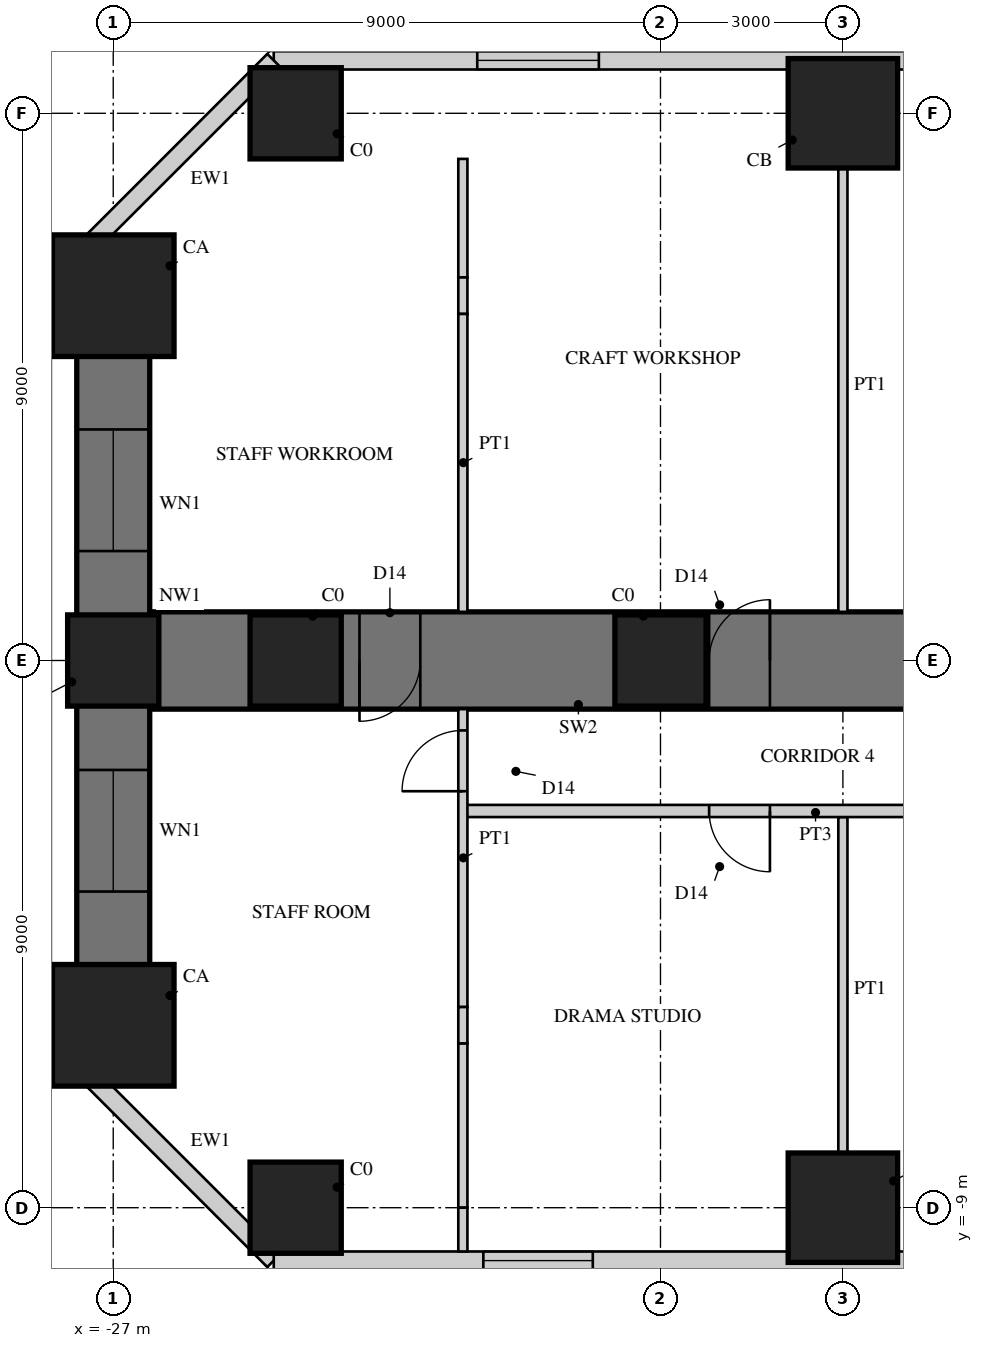
"""IFC4 building model, lengths in metres.
Left out: names, types, materials, properties, quantities, classifications, styles, units other than length and angle.
Written with IfcOpenShell. Run it as: python <this file> out.ifc"""

import sys

from ifc_helpers import new_model, si_unit, direction, frame, frame_2d, origin, origin_2d, place, context, subcontext, project, spatial, rectangle, hollow_rectangle, extrude, element, fill, save


model = new_model("IFC4")
c1 = context("Model", 3, precision=1e-05, world=origin(), true_north=direction((0.0, 1.0)))
c2 = subcontext(c1, "Body", "Model", "MODEL_VIEW")
j1 = project(units=[si_unit("LENGTHUNIT", "METRE"), si_unit("PLANEANGLEUNIT", "RADIAN")], contexts=[c1])
p1 = place(None, origin())
s1 = spatial("IfcSite", under=j1, at=p1, CompositionType="ELEMENT")
p2 = place(p1, origin())
s2 = spatial("IfcBuilding", under=s1, at=p2, CompositionType="ELEMENT")
p3 = place(p2, frame((0.0, 0.0, 14.0)))
s3 = spatial("IfcBuildingStorey", under=s2, at=p3, CompositionType="ELEMENT", Elevation=14.0)
p4 = place(p3, frame((-9.0, 0.0, 0.0), z_axis=(0.0, 0.0, 1.0), x_axis=(-1.0, 0.0, 0.0)))
e1 = element("IfcWall", 1, at=p4, inside=s3, PredefinedType="SHEAR", context=c2, shape_type="SweptSolid", body=[
    extrude(rectangle(XDim=18.0, YDim=1.6, at=frame_2d((9.0, 0.0))), origin(), (0.0, 0.0, 1.0), 4.5),
])
p5 = place(p4, frame((1.85, 0.0, 0.0)))
e2 = element("IfcOpeningElement", 2, at=p5, cuts=e1, PredefinedType="OPENING", context=c2, shape_type="SweptSolid", body=[
    extrude(rectangle(XDim=1.0, YDim=2.2, at=frame_2d((0.5, 1.1))), frame((0.0, 0.81, 0.0), z_axis=(0.0, -1.0, 0.0), x_axis=(1.0, 0.0, 0.0)), (0.0, 0.0, 1.0), 1.62),
])
p6 = place(p4, frame((7.2, 0.0, 0.0)))
e3 = element("IfcOpeningElement", 3, at=p6, cuts=e1, PredefinedType="OPENING", context=c2, shape_type="SweptSolid", body=[
    extrude(rectangle(XDim=1.0, YDim=2.2, at=frame_2d((0.5, 1.1))), frame((0.0, 0.81, 0.0), z_axis=(0.0, -1.0, 0.0), x_axis=(1.0, 0.0, 0.0)), (0.0, 0.0, 1.0), 1.62),
])
p7 = place(p4, frame((12.95, 0.0, 0.0)))
e4 = element("IfcOpeningElement", 4, at=p7, cuts=e1, PredefinedType="OPENING", context=c2, shape_type="SweptSolid", body=[
    extrude(rectangle(XDim=1.0, YDim=2.2, at=frame_2d((0.5, 1.1))), frame((0.0, 0.81, 0.0), z_axis=(0.0, -1.0, 0.0), x_axis=(1.0, 0.0, 0.0)), (0.0, 0.0, 1.0), 1.62),
])
p8 = place(p3, frame((-27.0, 6.0, 0.0), z_axis=(0.0, 0.0, 1.0), x_axis=(0.0, -1.0, 0.0)))
e5 = element("IfcWall", 5, at=p8, inside=s3, PredefinedType="SHEAR", context=c2, shape_type="SweptSolid", body=[
    extrude(rectangle(XDim=12.0, YDim=1.2, at=frame_2d((6.0, 0.0))), origin(), (0.0, 0.0, 1.0), 4.5),
])
p9 = place(p8, frame((2.2, 0.0, 0.9)))
e6 = element("IfcOpeningElement", 6, at=p9, cuts=e5, PredefinedType="OPENING", context=c2, shape_type="SweptSolid", body=[
    extrude(rectangle(XDim=2.0, YDim=1.8, at=frame_2d((1.0, 0.9))), frame((0.0, 0.61, 0.0), z_axis=(0.0, -1.0, 0.0), x_axis=(1.0, 0.0, 0.0)), (0.0, 0.0, 1.0), 1.22),
])
p10 = place(p8, frame((7.8, 0.0, 0.9)))
e7 = element("IfcOpeningElement", 7, at=p10, cuts=e5, PredefinedType="OPENING", context=c2, shape_type="SweptSolid", body=[
    extrude(rectangle(XDim=2.0, YDim=1.8, at=frame_2d((1.0, 0.9))), frame((0.0, 0.61, 0.0), z_axis=(0.0, -1.0, 0.0), x_axis=(1.0, 0.0, 0.0)), (0.0, 0.0, 1.0), 1.22),
])
p11 = place(p3, frame((-15.0, 9.0, 0.0), z_axis=(0.0, 0.0, 1.0), x_axis=(1.0, 0.0, 0.0)))
e8 = element("IfcColumn", 8, at=p11, inside=s3, PredefinedType="COLUMN", context=c2, shape_type="SweptSolid", body=[
    extrude(rectangle(XDim=1.8, YDim=1.8, at=origin_2d()), origin(), (0.0, 0.0, 1.0), 4.5),
])
p12 = place(p3, frame((-24.0, 9.0, 0.0), z_axis=(0.0, 0.0, 1.0), x_axis=(1.0, 0.0, 0.0)))
e9 = element("IfcColumn", 9, at=p12, inside=s3, PredefinedType="COLUMN", context=c2, shape_type="SweptSolid", body=[
    extrude(rectangle(XDim=1.5, YDim=1.5, at=origin_2d()), origin(), (0.0, 0.0, 1.0), 4.5),
])
p13 = place(p3, frame((-15.0, -9.0, 0.0), z_axis=(0.0, 0.0, 1.0), x_axis=(1.0, 0.0, 0.0)))
e10 = element("IfcColumn", 10, at=p13, inside=s3, PredefinedType="COLUMN", context=c2, shape_type="SweptSolid", body=[
    extrude(rectangle(XDim=1.8, YDim=1.8, at=origin_2d()), origin(), (0.0, 0.0, 1.0), 4.5),
])
p14 = place(p3, frame((-24.0, -9.0, 0.0), z_axis=(0.0, 0.0, 1.0), x_axis=(1.0, 0.0, 0.0)))
e11 = element("IfcColumn", 11, at=p14, inside=s3, PredefinedType="COLUMN", context=c2, shape_type="SweptSolid", body=[
    extrude(rectangle(XDim=1.5, YDim=1.5, at=origin_2d()), origin(), (0.0, 0.0, 1.0), 4.5),
])
p15 = place(p3, frame((-27.0, 6.0, 0.0), z_axis=(0.0, 0.0, 1.0), x_axis=(1.0, 0.0, 0.0)))
e12 = element("IfcColumn", 12, at=p15, inside=s3, PredefinedType="COLUMN", context=c2, shape_type="SweptSolid", body=[
    extrude(rectangle(XDim=2.0, YDim=2.0, at=origin_2d()), origin(), (0.0, 0.0, 1.0), 4.5),
])
p16 = place(p3, frame((-27.0, 0.0, 0.0), z_axis=(0.0, 0.0, 1.0), x_axis=(1.0, 0.0, 0.0)))
e13 = element("IfcColumn", 13, at=p16, inside=s3, PredefinedType="COLUMN", context=c2, shape_type="SweptSolid", body=[
    extrude(rectangle(XDim=1.5, YDim=1.5, at=origin_2d()), origin(), (0.0, 0.0, 1.0), 4.5),
])
p17 = place(p3, frame((-27.0, -6.0, 0.0), z_axis=(0.0, 0.0, 1.0), x_axis=(1.0, 0.0, 0.0)))
e14 = element("IfcColumn", 14, at=p17, inside=s3, PredefinedType="COLUMN", context=c2, shape_type="SweptSolid", body=[
    extrude(rectangle(XDim=2.0, YDim=2.0, at=origin_2d()), origin(), (0.0, 0.0, 1.0), 4.5),
])
for number, where, z_axis, x_axis in (
    (15, (-18.0, 0.0, 0.0), (0.0, 0.0, 1.0), (1.0, 0.0, 0.0)),
    (16, (-24.0, 0.0, 0.0), (0.0, 0.0, 1.0), (1.0, 0.0, 0.0)),
):
    element("IfcColumn", number, at=place(p3, frame(where, z_axis=z_axis, x_axis=x_axis)), inside=s3, PredefinedType="COLUMN", context=c2, shape_type="SweptSolid", body=[
        extrude(rectangle(XDim=1.5, YDim=1.5, at=origin_2d()), origin(), (0.0, 0.0, 1.0), 4.5),
    ])
p18 = place(p3, frame((-9.87, 9.87, 0.0), z_axis=(0.0, 0.0, 1.0), x_axis=(-1.0, 0.0, 0.0)))
e17 = element("IfcWall", 17, at=p18, inside=s3, PredefinedType="SOLIDWALL", context=c2, shape_type="SweptSolid", body=[
    extrude(rectangle(XDim=14.49, YDim=0.3, at=frame_2d((7.245, 0.0))), origin(), (0.0, 0.0, 1.0), 4.25),
])
p19 = place(p18, frame((9.143, 0.0, 0.9)))
e18 = element("IfcOpeningElement", 18, at=p19, cuts=e17, PredefinedType="OPENING", context=c2, shape_type="SweptSolid", body=[
    extrude(rectangle(XDim=2.0, YDim=1.8, at=frame_2d((1.0, 0.9))), frame((0.0, 0.16, 0.0), z_axis=(0.0, -1.0, 0.0), x_axis=(1.0, 0.0, 0.0)), (0.0, 0.0, 1.0), 0.32),
])
for number, where, z_axis, x_axis in (
    (19, (-24.36, 9.87, 0.0), (0.0, 0.0, 1.0), (-0.707, -0.707, 0.0)),
    (20, (-27.6, -6.63, 0.0), (0.0, 0.0, 1.0), (0.707, -0.707, 0.0)),
):
    element("IfcWall", number, at=place(p3, frame(where, z_axis=z_axis, x_axis=x_axis)), inside=s3, PredefinedType="SOLIDWALL", context=c2, shape_type="SweptSolid", body=[
        extrude(rectangle(XDim=4.582, YDim=0.3, at=frame_2d((2.291, 0.0))), origin(), (0.0, 0.0, 1.0), 4.25),
    ])
p20 = place(p3, frame((-24.36, -9.87, 0.0), z_axis=(0.0, 0.0, 1.0), x_axis=(1.0, 0.0, 0.0)))
e21 = element("IfcWall", 21, at=p20, inside=s3, PredefinedType="SOLIDWALL", context=c2, shape_type="SweptSolid", body=[
    extrude(rectangle(XDim=14.49, YDim=0.3, at=frame_2d((7.245, 0.0))), origin(), (0.0, 0.0, 1.0), 4.25),
])
p21 = place(p20, frame((10.9, 0.0, 0.0)))
e22 = element("IfcOpeningElement", 22, at=p21, cuts=e21, PredefinedType="OPENING", context=c2, shape_type="SweptSolid", body=[
    extrude(rectangle(XDim=1.0, YDim=2.4, at=frame_2d((0.5, 1.2))), frame((0.0, 0.16, 0.0), z_axis=(0.0, -1.0, 0.0), x_axis=(1.0, 0.0, 0.0)), (0.0, 0.0, 1.0), 0.32),
])
p22 = place(p20, frame((3.447, 0.0, 0.6)))
e23 = element("IfcOpeningElement", 23, at=p22, cuts=e21, PredefinedType="OPENING", context=c2, shape_type="SweptSolid", body=[
    extrude(rectangle(XDim=1.8, YDim=2.1, at=frame_2d((0.9, 1.05))), frame((0.0, 0.16, 0.0), z_axis=(0.0, -1.0, 0.0), x_axis=(1.0, 0.0, 0.0)), (0.0, 0.0, 1.0), 0.32),
])
p23 = place(p20, frame((12.141, 0.0, 0.6)))
e24 = element("IfcOpeningElement", 24, at=p23, cuts=e21, PredefinedType="OPENING", context=c2, shape_type="SweptSolid", body=[
    extrude(rectangle(XDim=1.8, YDim=2.1, at=frame_2d((0.9, 1.05))), frame((0.0, 0.16, 0.0), z_axis=(0.0, -1.0, 0.0), x_axis=(1.0, 0.0, 0.0)), (0.0, 0.0, 1.0), 0.32),
])
p24 = place(p3, frame((-15.0, -2.575, 0.0), z_axis=(0.0, 0.0, 1.0), x_axis=(0.0, -1.0, 0.0)))
e25 = element("IfcWall", 25, at=p24, inside=s3, PredefinedType="PARTITIONING", context=c2, shape_type="SweptSolid", body=[
    extrude(rectangle(XDim=5.675, YDim=0.15, at=frame_2d((2.837, 0.0))), origin(), (0.0, 0.0, 1.0), 3.2),
])
p25 = place(p3, frame((-15.0, 8.25, 0.0), z_axis=(0.0, 0.0, 1.0), x_axis=(0.0, -1.0, 0.0)))
e26 = element("IfcWall", 26, at=p25, inside=s3, PredefinedType="PARTITIONING", context=c2, shape_type="SweptSolid", body=[
    extrude(rectangle(XDim=7.45, YDim=0.15, at=frame_2d((3.725, 0.0))), origin(), (0.0, 0.0, 1.0), 3.2),
])
p26 = place(p3, frame((-9.65, -2.475, 0.0), z_axis=(0.0, 0.0, 1.0), x_axis=(-1.0, 0.0, 0.0)))
e27 = element("IfcWall", 27, at=p26, inside=s3, PredefinedType="SOLIDWALL", context=c2, shape_type="SweptSolid", body=[
    extrude(rectangle(XDim=11.6, YDim=0.2, at=frame_2d((5.8, 0.0))), origin(), (0.0, 0.0, 1.0), 4.25),
])
p27 = place(p26, frame((1.2, 0.0, 0.0)))
e28 = element("IfcOpeningElement", 28, at=p27, cuts=e27, PredefinedType="OPENING", context=c2, shape_type="SweptSolid", body=[
    extrude(rectangle(XDim=1.0, YDim=2.2, at=frame_2d((0.5, 1.1))), frame((0.0, 0.11, 0.0), z_axis=(0.0, -1.0, 0.0), x_axis=(1.0, 0.0, 0.0)), (0.0, 0.0, 1.0), 0.22),
])
p28 = place(p26, frame((6.55, 0.0, 0.0)))
e29 = element("IfcOpeningElement", 29, at=p28, cuts=e27, PredefinedType="OPENING", context=c2, shape_type="SweptSolid", body=[
    extrude(rectangle(XDim=1.0, YDim=2.2, at=frame_2d((0.5, 1.1))), frame((0.0, 0.11, 0.0), z_axis=(0.0, -1.0, 0.0), x_axis=(1.0, 0.0, 0.0)), (0.0, 0.0, 1.0), 0.22),
])
p29 = place(p3, frame((-21.25, 8.25, 0.0), z_axis=(0.0, 0.0, 1.0), x_axis=(0.0, -1.0, 0.0)))
e30 = element("IfcWall", 30, at=p29, inside=s3, PredefinedType="PARTITIONING", context=c2, shape_type="SweptSolid", body=[
    extrude(rectangle(XDim=1.95, YDim=0.15, at=frame_2d((0.975, 0.0))), origin(), (0.0, 0.0, 1.0), 3.3),
])
p30 = place(p3, frame((-21.25, 6.3, 0.0), z_axis=(0.0, 0.0, 1.0), x_axis=(0.0, -1.0, 0.0)))
e31 = element("IfcWall", 31, at=p30, inside=s3, PredefinedType="PARTITIONING", context=c2, shape_type="SweptSolid", body=[
    extrude(rectangle(XDim=0.6, YDim=0.15, at=frame_2d((0.3, 0.0))), origin(), (0.0, 0.0, 1.0), 4.25),
])
p31 = place(p3, frame((-21.25, 5.7, 0.0), z_axis=(0.0, 0.0, 1.0), x_axis=(0.0, -1.0, 0.0)))
e32 = element("IfcWall", 32, at=p31, inside=s3, PredefinedType="PARTITIONING", context=c2, shape_type="SweptSolid", body=[
    extrude(rectangle(XDim=4.9, YDim=0.15, at=frame_2d((2.45, 0.0))), origin(), (0.0, 0.0, 1.0), 3.3),
])
p32 = place(p3, frame((-21.25, -0.8, 0.0), z_axis=(0.0, 0.0, 1.0), x_axis=(0.0, -1.0, 0.0)))
e33 = element("IfcWall", 33, at=p32, inside=s3, PredefinedType="PARTITIONING", context=c2, shape_type="SweptSolid", body=[
    extrude(rectangle(XDim=4.9, YDim=0.15, at=frame_2d((2.45, 0.0))), origin(), (0.0, 0.0, 1.0), 3.3),
])
p33 = place(p32, frame((0.35, 0.0, 0.0)))
e34 = element("IfcOpeningElement", 34, at=p33, cuts=e33, PredefinedType="OPENING", context=c2, shape_type="SweptSolid", body=[
    extrude(rectangle(XDim=1.0, YDim=2.2, at=frame_2d((0.5, 1.1))), frame((0.0, 0.085, 0.0), z_axis=(0.0, -1.0, 0.0), x_axis=(1.0, 0.0, 0.0)), (0.0, 0.0, 1.0), 0.17),
])
p34 = place(p3, frame((-21.25, -5.7, 0.0), z_axis=(0.0, 0.0, 1.0), x_axis=(0.0, -1.0, 0.0)))
e35 = element("IfcWall", 35, at=p34, inside=s3, PredefinedType="PARTITIONING", context=c2, shape_type="SweptSolid", body=[
    extrude(rectangle(XDim=0.6, YDim=0.15, at=frame_2d((0.3, 0.0))), origin(), (0.0, 0.0, 1.0), 4.25),
])
p35 = place(p3, frame((-21.25, -6.3, 0.0), z_axis=(0.0, 0.0, 1.0), x_axis=(0.0, -1.0, 0.0)))
e36 = element("IfcWall", 36, at=p35, inside=s3, PredefinedType="PARTITIONING", context=c2, shape_type="SweptSolid", body=[
    extrude(rectangle(XDim=2.7, YDim=0.15, at=frame_2d((1.35, 0.0))), origin(), (0.0, 0.0, 1.0), 3.3),
])
p36 = place(p3, frame((-21.25, -9.0, 0.0), z_axis=(0.0, 0.0, 1.0), x_axis=(0.0, -1.0, 0.0)))
e37 = element("IfcWall", 37, at=p36, inside=s3, PredefinedType="PARTITIONING", context=c2, shape_type="SweptSolid", body=[
    extrude(rectangle(XDim=0.72, YDim=0.15, at=frame_2d((0.36, 0.0))), origin(), (0.0, 0.0, 1.0), 4.25),
])
p37 = place(p19, origin())
e38 = element("IfcWindow", 38, at=p37, inside=s3, PartitioningType="SINGLE_PANEL", PredefinedType="WINDOW", context=c2, shape_type="SweptSolid", body=[
    extrude(hollow_rectangle(XDim=2.0, YDim=1.8, WallThickness=0.06, at=frame_2d((1.0, 0.9))), frame((0.0, 0.03, 0.0), z_axis=(0.0, -1.0, 0.0), x_axis=(1.0, 0.0, 0.0)), (0.0, 0.0, 1.0), 0.06),
    extrude(rectangle(XDim=1.879, YDim=1.679, at=frame_2d((1.0, 0.9))), frame((0.0, 0.03, 0.0), z_axis=(0.0, -1.0, 0.0), x_axis=(1.0, 0.0, 0.0)), (0.0, 0.0, 1.0), 0.06),
])
fill(e18, e38)
p38 = place(p9, origin())
e39 = element("IfcWindow", 39, at=p38, inside=s3, PartitioningType="SINGLE_PANEL", PredefinedType="WINDOW", context=c2, shape_type="SweptSolid", body=[
    extrude(hollow_rectangle(XDim=2.0, YDim=1.8, WallThickness=0.06, at=frame_2d((1.0, 0.9))), frame((0.0, 0.03, 0.0), z_axis=(0.0, -1.0, 0.0), x_axis=(1.0, 0.0, 0.0)), (0.0, 0.0, 1.0), 0.06),
    extrude(rectangle(XDim=1.879, YDim=1.679, at=frame_2d((1.0, 0.9))), frame((0.0, 0.03, 0.0), z_axis=(0.0, -1.0, 0.0), x_axis=(1.0, 0.0, 0.0)), (0.0, 0.0, 1.0), 0.06),
])
fill(e6, e39)
p39 = place(p10, origin())
e40 = element("IfcWindow", 40, at=p39, inside=s3, PartitioningType="SINGLE_PANEL", PredefinedType="WINDOW", context=c2, shape_type="SweptSolid", body=[
    extrude(hollow_rectangle(XDim=2.0, YDim=1.8, WallThickness=0.06, at=frame_2d((1.0, 0.9))), frame((0.0, 0.03, 0.0), z_axis=(0.0, -1.0, 0.0), x_axis=(1.0, 0.0, 0.0)), (0.0, 0.0, 1.0), 0.06),
    extrude(rectangle(XDim=1.879, YDim=1.679, at=frame_2d((1.0, 0.9))), frame((0.0, 0.03, 0.0), z_axis=(0.0, -1.0, 0.0), x_axis=(1.0, 0.0, 0.0)), (0.0, 0.0, 1.0), 0.06),
])
fill(e7, e40)
p40 = place(p22, origin())
e41 = element("IfcWindow", 41, at=p40, inside=s3, PartitioningType="SINGLE_PANEL", PredefinedType="WINDOW", context=c2, shape_type="SweptSolid", body=[
    extrude(hollow_rectangle(XDim=1.8, YDim=2.1, WallThickness=0.06, at=frame_2d((0.9, 1.05))), frame((0.0, 0.03, 0.0), z_axis=(0.0, -1.0, 0.0), x_axis=(1.0, 0.0, 0.0)), (0.0, 0.0, 1.0), 0.06),
    extrude(rectangle(XDim=1.679, YDim=1.979, at=frame_2d((0.9, 1.05))), frame((0.0, 0.03, 0.0), z_axis=(0.0, -1.0, 0.0), x_axis=(1.0, 0.0, 0.0)), (0.0, 0.0, 1.0), 0.06),
])
fill(e23, e41)
p41 = place(p28, origin())
e42 = element("IfcDoor", 42, at=p41, inside=s3, OperationType="SINGLE_SWING_LEFT", PredefinedType="DOOR", context=c2, shape_type="SweptSolid", body=[
    extrude(rectangle(XDim=1.0, YDim=2.2, at=frame_2d((0.5, 1.1))), frame((0.0, 0.025, 0.0), z_axis=(0.0, -1.0, 0.0), x_axis=(1.0, 0.0, 0.0)), (0.0, 0.0, 1.0), 0.05),
])
fill(e29, e42)
p42 = place(p33, frame((1.0, 0.0, 0.0), z_axis=(0.0, 0.0, 1.0), x_axis=(-1.0, 0.0, 0.0)))
e43 = element("IfcDoor", 43, at=p42, inside=s3, OperationType="SINGLE_SWING_LEFT", PredefinedType="DOOR", context=c2, shape_type="SweptSolid", body=[
    extrude(rectangle(XDim=1.0, YDim=2.2, at=frame_2d((0.5, 1.1))), frame((0.0, 0.025, 0.0), z_axis=(0.0, -1.0, 0.0), x_axis=(1.0, 0.0, 0.0)), (0.0, 0.0, 1.0), 0.05),
])
fill(e34, e43)
p43 = place(p6, frame((1.0, 0.0, 0.0), z_axis=(0.0, 0.0, 1.0), x_axis=(-1.0, 0.0, 0.0)))
e44 = element("IfcDoor", 44, at=p43, inside=s3, OperationType="SINGLE_SWING_RIGHT", PredefinedType="DOOR", context=c2, shape_type="SweptSolid", body=[
    extrude(rectangle(XDim=1.0, YDim=2.2, at=frame_2d((0.5, 1.1))), frame((0.0, 0.025, 0.0), z_axis=(0.0, -1.0, 0.0), x_axis=(1.0, 0.0, 0.0)), (0.0, 0.0, 1.0), 0.05),
])
fill(e3, e44)
p44 = place(p7, origin())
e45 = element("IfcDoor", 45, at=p44, inside=s3, OperationType="SINGLE_SWING_RIGHT", PredefinedType="DOOR", context=c2, shape_type="SweptSolid", body=[
    extrude(rectangle(XDim=1.0, YDim=2.2, at=frame_2d((0.5, 1.1))), frame((0.0, 0.025, 0.0), z_axis=(0.0, -1.0, 0.0), x_axis=(1.0, 0.0, 0.0)), (0.0, 0.0, 1.0), 0.05),
])
fill(e4, e45)
save(model, sys.argv[1])
